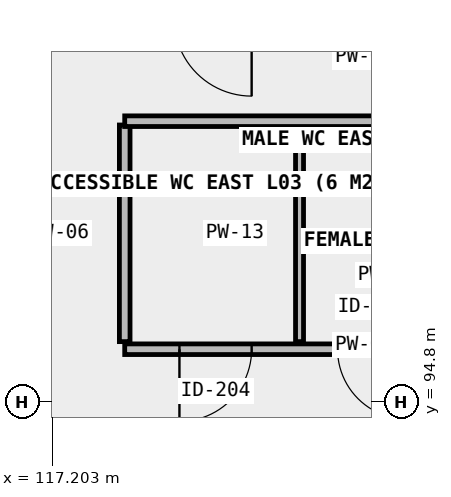
"""IFC4 building model, lengths in metres.
Left out: names, types, materials, properties, quantities, classifications, styles, units other than length and angle.
Written with IfcOpenShell. Run it as: python <this file> out.ifc"""

import sys

from ifc_helpers import new_model, si_unit, direction, frame, frame_2d, origin, place, context, subcontext, project, spatial, rectangle, extrude, element, fill, save


model = new_model("IFC4")
c1 = context("Model", 3, precision=1e-05, world=origin(), true_north=direction((0.0, 1.0)))
c2 = subcontext(c1, "Body", "Model", "MODEL_VIEW")
j1 = project(units=[si_unit("LENGTHUNIT", "METRE"), si_unit("PLANEANGLEUNIT", "RADIAN")], contexts=[c1])
p1 = place(None, origin())
s1 = spatial("IfcSite", under=j1, at=p1, CompositionType="ELEMENT")
p2 = place(p1, origin())
s2 = spatial("IfcBuilding", under=s1, at=p2, CompositionType="ELEMENT")
p3 = place(p2, frame((0.0, 0.0, 13.8)))
s3 = spatial("IfcBuildingStorey", under=s2, at=p3, CompositionType="ELEMENT", Elevation=13.8)
p4 = place(p3, frame((118.15, 95.5, 0.0), z_axis=(0.0, 0.0, 1.0), x_axis=(1.0, 0.0, 0.0)))
e1 = element("IfcWall", 1, at=p4, inside=s3, PredefinedType="PLUMBINGWALL", context=c2, shape_type="SweptSolid", body=[
    extrude(rectangle(XDim=6.3, YDim=0.14, at=frame_2d((3.15, 0.0))), origin(), (0.0, 0.0, 1.0), 4.22),
])
p5 = place(p4, frame((0.72, 0.0, 0.0)))
e2 = element("IfcOpeningElement", 2, at=p5, cuts=e1, PredefinedType="OPENING", context=c2, shape_type="SweptSolid", body=[
    extrude(rectangle(XDim=0.95, YDim=2.1, at=frame_2d((0.475, 1.05))), frame((0.0, 0.08, 0.0), z_axis=(0.0, -1.0, 0.0), x_axis=(1.0, 0.0, 0.0)), (0.0, 0.0, 1.0), 0.16),
])
p6 = place(p4, frame((2.8, 0.0, 0.0)))
e3 = element("IfcOpeningElement", 3, at=p6, cuts=e1, PredefinedType="OPENING", context=c2, shape_type="SweptSolid", body=[
    extrude(rectangle(XDim=0.92, YDim=2.1, at=frame_2d((0.46, 1.05))), frame((0.0, 0.08, 0.0), z_axis=(0.0, -1.0, 0.0), x_axis=(1.0, 0.0, 0.0)), (0.0, 0.0, 1.0), 0.16),
])
p7 = place(p4, frame((4.8, 0.0, 0.0)))
e4 = element("IfcOpeningElement", 4, at=p7, cuts=e1, PredefinedType="OPENING", context=c2, shape_type="SweptSolid", body=[
    extrude(rectangle(XDim=0.92, YDim=2.1, at=frame_2d((0.46, 1.05))), frame((0.0, 0.08, 0.0), z_axis=(0.0, -1.0, 0.0), x_axis=(1.0, 0.0, 0.0)), (0.0, 0.0, 1.0), 0.16),
])
p8 = place(p3, frame((118.15, 95.6, 0.0), z_axis=(0.0, 0.0, 1.0), x_axis=(0.0, 1.0, 0.0)))
e5 = element("IfcWall", 5, at=p8, inside=s3, PredefinedType="PLUMBINGWALL", context=c2, shape_type="SweptSolid", body=[
    extrude(rectangle(XDim=2.85, YDim=0.14, at=frame_2d((1.425, 0.0))), origin(), (0.0, 0.0, 1.0), 4.22),
])
p9 = place(p3, frame((120.45, 95.6, 0.0), z_axis=(0.0, 0.0, 1.0), x_axis=(0.0, 1.0, 0.0)))
e6 = element("IfcWall", 6, at=p9, inside=s3, PredefinedType="PARTITIONING", context=c2, shape_type="SweptSolid", body=[
    extrude(rectangle(XDim=2.85, YDim=0.105, at=frame_2d((1.425, 0.0))), origin(), (0.0, 0.0, 1.0), 4.22),
])
p10 = place(p3, frame((118.15, 98.5, 0.0), z_axis=(0.0, 0.0, 1.0), x_axis=(1.0, 0.0, 0.0)))
e7 = element("IfcWall", 7, at=p10, inside=s3, PredefinedType="PLUMBINGWALL", context=c2, shape_type="SweptSolid", body=[
    extrude(rectangle(XDim=6.3, YDim=0.14, at=frame_2d((3.15, 0.0))), origin(), (0.0, 0.0, 1.0), 4.22),
])
p11 = place(p5, frame((0.475, 0.0, 0.0), z_axis=(0.0, 0.0, 1.0), x_axis=(-1.0, 0.0, 0.0)))
e8 = element("IfcDoor", 8, at=p11, inside=s3, OperationType="SINGLE_SWING_LEFT", PredefinedType="DOOR", context=c2, shape_type="SweptSolid", body=[
    extrude(rectangle(XDim=0.95, YDim=2.1, at=frame_2d((0.0, 1.05))), frame((0.0, 0.025, 0.0), z_axis=(0.0, -1.0, 0.0), x_axis=(1.0, 0.0, 0.0)), (0.0, 0.0, 1.0), 0.05),
])
fill(e2, e8)
p12 = place(p6, origin())
e9 = element("IfcDoor", 9, at=p12, inside=s3, OperationType="SINGLE_SWING_RIGHT", PredefinedType="DOOR", context=c2, shape_type="SweptSolid", body=[
    extrude(rectangle(XDim=0.92, YDim=2.1, at=frame_2d((0.46, 1.05))), frame((0.0, 0.025, 0.0), z_axis=(0.0, -1.0, 0.0), x_axis=(1.0, 0.0, 0.0)), (0.0, 0.0, 1.0), 0.05),
])
fill(e3, e9)
save(model, sys.argv[1])
